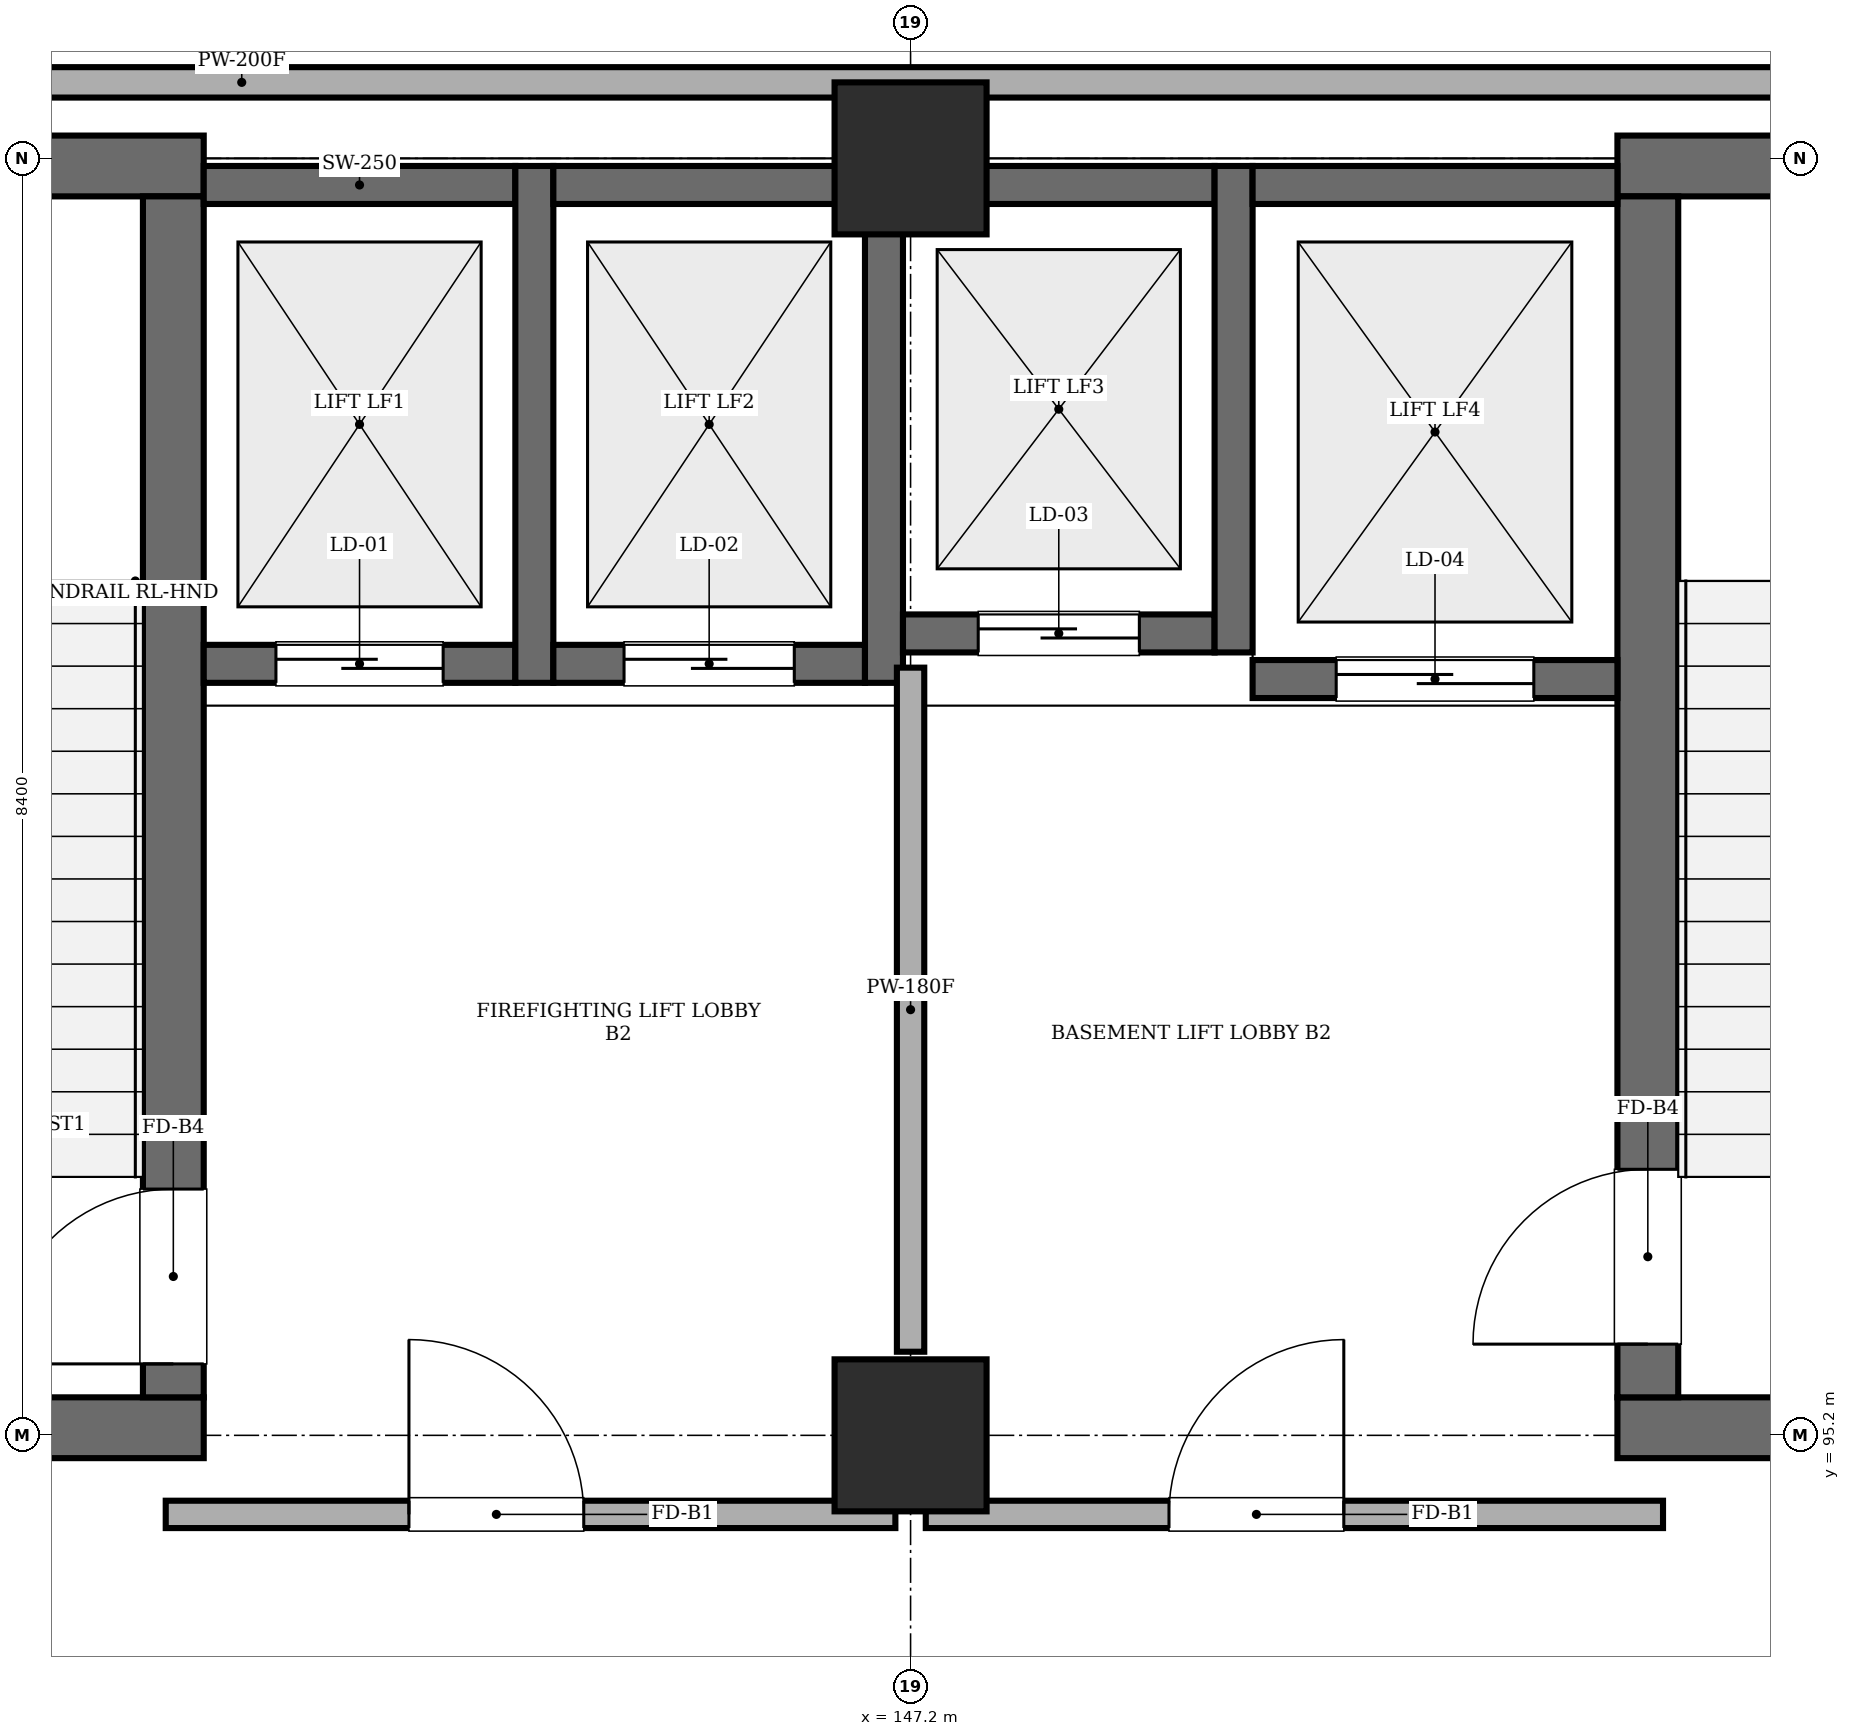
"""IFC4 building model, lengths in metres.
Left out: names, types, materials, properties, quantities, classifications, styles, units other than length and angle.
Written with IfcOpenShell. Run it as: python <this file> out.ifc"""

import sys

from ifc_helpers import new_model, si_unit, direction, frame, frame_2d, origin, origin_2d, place, context, subcontext, project, spatial, rectangle, extrude, element, fill, save


model = new_model("IFC4")
c1 = context("Model", 3, precision=1e-05, world=origin(), true_north=direction((0.0, 1.0)))
c2 = subcontext(c1, "Body", "Model", "MODEL_VIEW")
j1 = project(units=[si_unit("LENGTHUNIT", "METRE"), si_unit("PLANEANGLEUNIT", "RADIAN")], contexts=[c1])
p1 = place(None, origin())
s1 = spatial("IfcSite", under=j1, at=p1, CompositionType="ELEMENT")
p2 = place(p1, origin())
s2 = spatial("IfcBuilding", under=s1, at=p2, CompositionType="ELEMENT")
p3 = place(p2, frame((0.0, 0.0, -9.6)))
s3 = spatial("IfcBuildingStorey", under=s2, at=p3, CompositionType="ELEMENT", Elevation=-9.6)
for number, where, z_axis, x_axis in (
    (1, (147.2, 95.2, 0.0), (0.0, 0.0, 1.0), (1.0, 0.0, 0.0)),
    (2, (147.2, 103.6, 0.0), (0.0, 0.0, 1.0), (1.0, 0.0, 0.0)),
):
    element("IfcColumn", number, at=place(p3, frame(where, z_axis=z_axis, x_axis=x_axis)), inside=s3, PredefinedType="COLUMN", context=c2, shape_type="SweptSolid", body=[
        extrude(rectangle(XDim=1.0, YDim=1.0, at=origin_2d()), origin(), (0.0, 0.0, 1.0), 4.48),
    ])
for number, where, z_axis, x_axis in (
    (3, (138.65, 95.25, 0.0), (0.0, 0.0, 1.0), (1.0, 0.0, 0.0)),
    (4, (138.65, 103.55, 0.0), (0.0, 0.0, 1.0), (1.0, 0.0, 0.0)),
):
    element("IfcWall", number, at=place(p3, frame(where, z_axis=z_axis, x_axis=x_axis)), inside=s3, PredefinedType="SHEAR", context=c2, shape_type="SweptSolid", body=[
        extrude(rectangle(XDim=3.9, YDim=0.4, at=frame_2d((1.95, 0.0))), origin(), (0.0, 0.0, 1.0), 4.48),
    ])
p4 = place(p3, frame((142.35, 95.45, 0.0), z_axis=(0.0, 0.0, 1.0), x_axis=(0.0, 1.0, 0.0)))
e5 = element("IfcWall", 5, at=p4, inside=s3, PredefinedType="SHEAR", context=c2, shape_type="SweptSolid", body=[
    extrude(rectangle(XDim=7.9, YDim=0.4, at=frame_2d((3.95, 0.0))), origin(), (0.0, 0.0, 1.0), 4.48),
])
p5 = place(p4, frame((0.22, 0.0, 0.0)))
e6 = element("IfcOpeningElement", 6, at=p5, cuts=e5, PredefinedType="OPENING", context=c2, shape_type="SweptSolid", body=[
    extrude(rectangle(XDim=1.15, YDim=2.15, at=frame_2d((0.575, 1.075))), frame((0.0, 0.21, 0.0), z_axis=(0.0, -1.0, 0.0), x_axis=(1.0, 0.0, 0.0)), (0.0, 0.0, 1.0), 0.42),
])
for number, where, z_axis, x_axis in (
    (7, (151.85, 95.25, 0.0), (0.0, 0.0, 1.0), (1.0, 0.0, 0.0)),
    (8, (151.85, 103.55, 0.0), (0.0, 0.0, 1.0), (1.0, 0.0, 0.0)),
):
    element("IfcWall", number, at=place(p3, frame(where, z_axis=z_axis, x_axis=x_axis)), inside=s3, PredefinedType="SHEAR", context=c2, shape_type="SweptSolid", body=[
        extrude(rectangle(XDim=3.9, YDim=0.4, at=frame_2d((1.95, 0.0))), origin(), (0.0, 0.0, 1.0), 4.48),
    ])
p6 = place(p3, frame((152.05, 95.45, 0.0), z_axis=(0.0, 0.0, 1.0), x_axis=(0.0, 1.0, 0.0)))
e9 = element("IfcWall", 9, at=p6, inside=s3, PredefinedType="SHEAR", context=c2, shape_type="SweptSolid", body=[
    extrude(rectangle(XDim=7.9, YDim=0.4, at=frame_2d((3.95, 0.0))), origin(), (0.0, 0.0, 1.0), 4.48),
])
p7 = place(p6, frame((0.35, 0.0, 0.0)))
e10 = element("IfcOpeningElement", 10, at=p7, cuts=e9, PredefinedType="OPENING", context=c2, shape_type="SweptSolid", body=[
    extrude(rectangle(XDim=1.15, YDim=2.15, at=frame_2d((0.575, 1.075))), frame((0.0, 0.21, 0.0), z_axis=(0.0, -1.0, 0.0), x_axis=(1.0, 0.0, 0.0)), (0.0, 0.0, 1.0), 0.42),
])
p8 = place(p3, frame((142.55, 100.275, 0.0), z_axis=(0.0, 0.0, 1.0), x_axis=(1.0, 0.0, 0.0)))
e11 = element("IfcWall", 11, at=p8, inside=s3, PredefinedType="SHEAR", context=c2, shape_type="SweptSolid", body=[
    extrude(rectangle(XDim=2.05, YDim=0.25, at=frame_2d((1.025, 0.0))), origin(), (0.0, 0.0, 1.0), 4.48),
])
p9 = place(p8, frame((0.475, 0.0, 0.0)))
e12 = element("IfcOpeningElement", 12, at=p9, cuts=e11, PredefinedType="OPENING", context=c2, shape_type="SweptSolid", body=[
    extrude(rectangle(XDim=1.1, YDim=2.15, at=frame_2d((0.55, 1.075))), frame((0.0, 0.135, 0.0), z_axis=(0.0, -1.0, 0.0), x_axis=(1.0, 0.0, 0.0)), (0.0, 0.0, 1.0), 0.27),
])
p10 = place(p3, frame((142.55, 103.425, 0.0), z_axis=(0.0, 0.0, 1.0), x_axis=(1.0, 0.0, 0.0)))
e13 = element("IfcWall", 13, at=p10, inside=s3, PredefinedType="SHEAR", context=c2, shape_type="SweptSolid", body=[
    extrude(rectangle(XDim=2.05, YDim=0.25, at=frame_2d((1.025, 0.0))), origin(), (0.0, 0.0, 1.0), 4.48),
])
p11 = place(p3, frame((144.725, 100.15, 0.0), z_axis=(0.0, 0.0, 1.0), x_axis=(0.0, 1.0, 0.0)))
e14 = element("IfcWall", 14, at=p11, inside=s3, PredefinedType="SHEAR", context=c2, shape_type="SweptSolid", body=[
    extrude(rectangle(XDim=3.4, YDim=0.25, at=frame_2d((1.7, 0.0))), origin(), (0.0, 0.0, 1.0), 4.48),
])
p12 = place(p3, frame((144.85, 100.275, 0.0), z_axis=(0.0, 0.0, 1.0), x_axis=(1.0, 0.0, 0.0)))
e15 = element("IfcWall", 15, at=p12, inside=s3, PredefinedType="SHEAR", context=c2, shape_type="SweptSolid", body=[
    extrude(rectangle(XDim=2.05, YDim=0.25, at=frame_2d((1.025, 0.0))), origin(), (0.0, 0.0, 1.0), 4.48),
])
p13 = place(p12, frame((0.465, 0.0, 0.0)))
e16 = element("IfcOpeningElement", 16, at=p13, cuts=e15, PredefinedType="OPENING", context=c2, shape_type="SweptSolid", body=[
    extrude(rectangle(XDim=1.12, YDim=2.15, at=frame_2d((0.56, 1.075))), frame((0.0, 0.135, 0.0), z_axis=(0.0, -1.0, 0.0), x_axis=(1.0, 0.0, 0.0)), (0.0, 0.0, 1.0), 0.27),
])
p14 = place(p3, frame((144.85, 103.425, 0.0), z_axis=(0.0, 0.0, 1.0), x_axis=(1.0, 0.0, 0.0)))
e17 = element("IfcWall", 17, at=p14, inside=s3, PredefinedType="SHEAR", context=c2, shape_type="SweptSolid", body=[
    extrude(rectangle(XDim=2.05, YDim=0.25, at=frame_2d((1.025, 0.0))), origin(), (0.0, 0.0, 1.0), 4.48),
])
p15 = place(p3, frame((147.025, 100.15, 0.0), z_axis=(0.0, 0.0, 1.0), x_axis=(0.0, 1.0, 0.0)))
e18 = element("IfcWall", 18, at=p15, inside=s3, PredefinedType="SHEAR", context=c2, shape_type="SweptSolid", body=[
    extrude(rectangle(XDim=3.4, YDim=0.25, at=frame_2d((1.7, 0.0))), origin(), (0.0, 0.0, 1.0), 4.48),
])
p16 = place(p3, frame((147.15, 100.475, 0.0), z_axis=(0.0, 0.0, 1.0), x_axis=(1.0, 0.0, 0.0)))
e19 = element("IfcWall", 19, at=p16, inside=s3, PredefinedType="SHEAR", context=c2, shape_type="SweptSolid", body=[
    extrude(rectangle(XDim=2.05, YDim=0.25, at=frame_2d((1.025, 0.0))), origin(), (0.0, 0.0, 1.0), 4.48),
])
p17 = place(p16, frame((0.495, 0.0, 0.0)))
e20 = element("IfcOpeningElement", 20, at=p17, cuts=e19, PredefinedType="OPENING", context=c2, shape_type="SweptSolid", body=[
    extrude(rectangle(XDim=1.06, YDim=2.15, at=frame_2d((0.53, 1.075))), frame((0.0, 0.135, 0.0), z_axis=(0.0, -1.0, 0.0), x_axis=(1.0, 0.0, 0.0)), (0.0, 0.0, 1.0), 0.27),
])
p18 = place(p3, frame((147.15, 103.425, 0.0), z_axis=(0.0, 0.0, 1.0), x_axis=(1.0, 0.0, 0.0)))
e21 = element("IfcWall", 21, at=p18, inside=s3, PredefinedType="SHEAR", context=c2, shape_type="SweptSolid", body=[
    extrude(rectangle(XDim=2.05, YDim=0.25, at=frame_2d((1.025, 0.0))), origin(), (0.0, 0.0, 1.0), 4.48),
])
p19 = place(p3, frame((149.325, 100.35, 0.0), z_axis=(0.0, 0.0, 1.0), x_axis=(0.0, 1.0, 0.0)))
e22 = element("IfcWall", 22, at=p19, inside=s3, PredefinedType="SHEAR", context=c2, shape_type="SweptSolid", body=[
    extrude(rectangle(XDim=3.2, YDim=0.25, at=frame_2d((1.6, 0.0))), origin(), (0.0, 0.0, 1.0), 4.48),
])
p20 = place(p3, frame((149.45, 100.175, 0.0), z_axis=(0.0, 0.0, 1.0), x_axis=(1.0, 0.0, 0.0)))
e23 = element("IfcWall", 23, at=p20, inside=s3, PredefinedType="SHEAR", context=c2, shape_type="SweptSolid", body=[
    extrude(rectangle(XDim=2.4, YDim=0.25, at=frame_2d((1.2, 0.0))), origin(), (0.0, 0.0, 1.0), 4.48),
])
p21 = place(p20, frame((0.55, 0.0, 0.0)))
e24 = element("IfcOpeningElement", 24, at=p21, cuts=e23, PredefinedType="OPENING", context=c2, shape_type="SweptSolid", body=[
    extrude(rectangle(XDim=1.3, YDim=2.25, at=frame_2d((0.65, 1.125))), frame((0.0, 0.135, 0.0), z_axis=(0.0, -1.0, 0.0), x_axis=(1.0, 0.0, 0.0)), (0.0, 0.0, 1.0), 0.27),
])
p22 = place(p3, frame((149.45, 103.425, 0.0), z_axis=(0.0, 0.0, 1.0), x_axis=(1.0, 0.0, 0.0)))
e25 = element("IfcWall", 25, at=p22, inside=s3, PredefinedType="SHEAR", context=c2, shape_type="SweptSolid", body=[
    extrude(rectangle(XDim=2.4, YDim=0.25, at=frame_2d((1.2, 0.0))), origin(), (0.0, 0.0, 1.0), 4.48),
])
p23 = place(p3, frame((142.3, 94.68, 0.0), z_axis=(0.0, 0.0, 1.0), x_axis=(1.0, 0.0, 0.0)))
e26 = element("IfcWall", 26, at=p23, inside=s3, PredefinedType="STANDARD", context=c2, shape_type="SweptSolid", body=[
    extrude(rectangle(XDim=4.8, YDim=0.18, at=frame_2d((2.4, 0.0))), origin(), (0.0, 0.0, 1.0), 4.48),
])
p24 = place(p23, frame((1.6, 0.0, 0.0)))
e27 = element("IfcOpeningElement", 27, at=p24, cuts=e26, PredefinedType="OPENING", context=c2, shape_type="SweptSolid", body=[
    extrude(rectangle(XDim=1.15, YDim=2.15, at=frame_2d((0.575, 1.075))), frame((0.0, 0.1, 0.0), z_axis=(0.0, -1.0, 0.0), x_axis=(1.0, 0.0, 0.0)), (0.0, 0.0, 1.0), 0.2),
])
p25 = place(p3, frame((147.3, 94.68, 0.0), z_axis=(0.0, 0.0, 1.0), x_axis=(1.0, 0.0, 0.0)))
e28 = element("IfcWall", 28, at=p25, inside=s3, PredefinedType="STANDARD", context=c2, shape_type="SweptSolid", body=[
    extrude(rectangle(XDim=4.85, YDim=0.18, at=frame_2d((2.425, 0.0))), origin(), (0.0, 0.0, 1.0), 4.48),
])
p26 = place(p25, frame((1.6, 0.0, 0.0)))
e29 = element("IfcOpeningElement", 29, at=p26, cuts=e28, PredefinedType="OPENING", context=c2, shape_type="SweptSolid", body=[
    extrude(rectangle(XDim=1.15, YDim=2.15, at=frame_2d((0.575, 1.075))), frame((0.0, 0.1, 0.0), z_axis=(0.0, -1.0, 0.0), x_axis=(1.0, 0.0, 0.0)), (0.0, 0.0, 1.0), 0.2),
])
p27 = place(p3, frame((147.2, 95.75, 0.0), z_axis=(0.0, 0.0, 1.0), x_axis=(0.0, 1.0, 0.0)))
e30 = element("IfcWall", 30, at=p27, inside=s3, PredefinedType="STANDARD", context=c2, shape_type="SweptSolid", body=[
    extrude(rectangle(XDim=4.5, YDim=0.18, at=frame_2d((2.25, 0.0))), origin(), (0.0, 0.0, 1.0), 3.63),
])
p28 = place(p3, frame((122.4, 104.1, 0.0), z_axis=(0.0, 0.0, 1.0), x_axis=(1.0, 0.0, 0.0)))
e31 = element("IfcWall", 31, at=p28, inside=s3, PredefinedType="SOLIDWALL", context=c2, shape_type="SweptSolid", body=[
    extrude(rectangle(XDim=40.8, YDim=0.2, at=frame_2d((20.4, 0.0))), origin(), (0.0, 0.0, 1.0), 4.48),
])
p29 = place(p28, frame((11.2, 0.0, 0.0)))
e32 = element("IfcOpeningElement", 32, at=p29, cuts=e31, PredefinedType="OPENING", context=c2, shape_type="SweptSolid", body=[
    extrude(rectangle(XDim=1.25, YDim=2.2, at=frame_2d((0.625, 1.1))), frame((0.0, 0.11, 0.0), z_axis=(0.0, -1.0, 0.0), x_axis=(1.0, 0.0, 0.0)), (0.0, 0.0, 1.0), 0.22),
])
p30 = place(p24, origin())
e33 = element("IfcDoor", 33, at=p30, inside=s3, OperationType="SINGLE_SWING_LEFT", PredefinedType="DOOR", context=c2, shape_type="SweptSolid", body=[
    extrude(rectangle(XDim=1.15, YDim=2.15, at=frame_2d((0.575, 1.075))), frame((0.0, 0.025, 0.0), z_axis=(0.0, -1.0, 0.0), x_axis=(1.0, 0.0, 0.0)), (0.0, 0.0, 1.0), 0.05),
])
fill(e27, e33)
p31 = place(p26, origin())
e34 = element("IfcDoor", 34, at=p31, inside=s3, OperationType="SINGLE_SWING_RIGHT", PredefinedType="DOOR", context=c2, shape_type="SweptSolid", body=[
    extrude(rectangle(XDim=1.15, YDim=2.15, at=frame_2d((0.575, 1.075))), frame((0.0, 0.025, 0.0), z_axis=(0.0, -1.0, 0.0), x_axis=(1.0, 0.0, 0.0)), (0.0, 0.0, 1.0), 0.05),
])
fill(e29, e34)
p32 = place(p5, origin())
e35 = element("IfcDoor", 35, at=p32, inside=s3, OperationType="SINGLE_SWING_LEFT", PredefinedType="DOOR", context=c2, shape_type="SweptSolid", body=[
    extrude(rectangle(XDim=1.15, YDim=2.15, at=frame_2d((0.575, 1.075))), frame((0.0, 0.025, 0.0), z_axis=(0.0, -1.0, 0.0), x_axis=(1.0, 0.0, 0.0)), (0.0, 0.0, 1.0), 0.05),
])
fill(e6, e35)
p33 = place(p7, origin())
e36 = element("IfcDoor", 36, at=p33, inside=s3, OperationType="SINGLE_SWING_LEFT", PredefinedType="DOOR", context=c2, shape_type="SweptSolid", body=[
    extrude(rectangle(XDim=1.15, YDim=2.15, at=frame_2d((0.575, 1.075))), frame((0.0, 0.025, 0.0), z_axis=(0.0, -1.0, 0.0), x_axis=(1.0, 0.0, 0.0)), (0.0, 0.0, 1.0), 0.05),
])
fill(e10, e36)
p34 = place(p9, origin())
e37 = element("IfcDoor", 37, at=p34, inside=s3, OperationType="SLIDING_TO_LEFT", PredefinedType="DOOR", context=c2, shape_type="SweptSolid", body=[
    extrude(rectangle(XDim=1.1, YDim=2.15, at=frame_2d((0.55, 1.075))), frame((0.0, 0.025, 0.0), z_axis=(0.0, -1.0, 0.0), x_axis=(1.0, 0.0, 0.0)), (0.0, 0.0, 1.0), 0.05),
])
fill(e12, e37)
p35 = place(p13, origin())
e38 = element("IfcDoor", 38, at=p35, inside=s3, OperationType="SLIDING_TO_LEFT", PredefinedType="DOOR", context=c2, shape_type="SweptSolid", body=[
    extrude(rectangle(XDim=1.12, YDim=2.15, at=frame_2d((0.56, 1.075))), frame((0.0, 0.025, 0.0), z_axis=(0.0, -1.0, 0.0), x_axis=(1.0, 0.0, 0.0)), (0.0, 0.0, 1.0), 0.05),
])
fill(e16, e38)
p36 = place(p17, origin())
e39 = element("IfcDoor", 39, at=p36, inside=s3, OperationType="SLIDING_TO_LEFT", PredefinedType="DOOR", context=c2, shape_type="SweptSolid", body=[
    extrude(rectangle(XDim=1.06, YDim=2.15, at=frame_2d((0.53, 1.075))), frame((0.0, 0.025, 0.0), z_axis=(0.0, -1.0, 0.0), x_axis=(1.0, 0.0, 0.0)), (0.0, 0.0, 1.0), 0.05),
])
fill(e20, e39)
p37 = place(p21, origin())
e40 = element("IfcDoor", 40, at=p37, inside=s3, OperationType="SLIDING_TO_LEFT", PredefinedType="DOOR", context=c2, shape_type="SweptSolid", body=[
    extrude(rectangle(XDim=1.3, YDim=2.25, at=frame_2d((0.65, 1.125))), frame((0.0, 0.025, 0.0), z_axis=(0.0, -1.0, 0.0), x_axis=(1.0, 0.0, 0.0)), (0.0, 0.0, 1.0), 0.05),
])
fill(e24, e40)
save(model, sys.argv[1])
